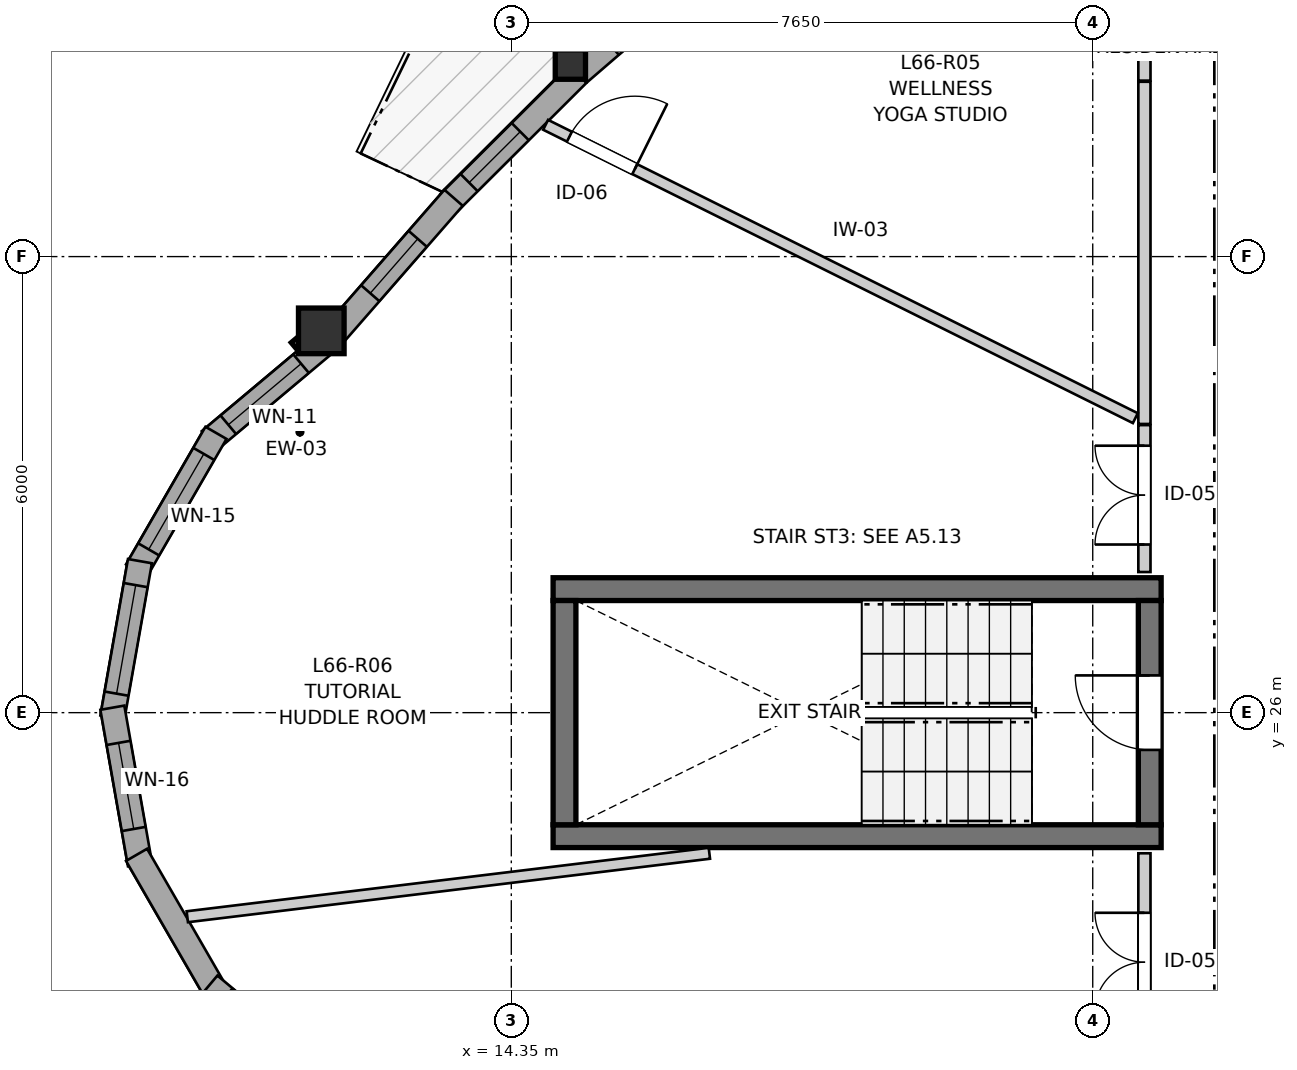
"""IFC4 building model, lengths in metres.
Left out: names, types, materials, properties, quantities, classifications, styles, units other than length and angle.
Written with IfcOpenShell. Run it as: python <this file> out.ifc"""

import sys

from ifc_helpers import new_model, si_unit, direction, frame, frame_2d, origin, origin_2d, place, context, subcontext, project, spatial, rectangle, i_section, extrude, source, transform, mapped, element, fill, save


model = new_model("IFC4")
c1 = context("Model", 3, precision=1e-05, world=origin(), true_north=direction((0.0, 1.0)))
c2 = subcontext(c1, "Body", "Model", "MODEL_VIEW")
j1 = project(units=[si_unit("LENGTHUNIT", "METRE"), si_unit("PLANEANGLEUNIT", "RADIAN")], contexts=[c1])
p1 = place(None, origin())
s1 = spatial("IfcSite", under=j1, at=p1, CompositionType="ELEMENT")
p2 = place(p1, origin())
s2 = spatial("IfcBuilding", under=s1, at=p2, CompositionType="ELEMENT")
p3 = place(p2, frame((0.0, 0.0, 221.2)))
s3 = spatial("IfcBuildingStorey", under=s2, at=p3, CompositionType="ELEMENT", Elevation=221.2)
for number, where, z_axis, x_axis in (
    (1, (14.9, 24.375, 0.0), (0.0, 0.0, 1.0), (1.0, 0.0, 0.0)),
    (2, (22.9, 27.625, 0.0), (0.0, 0.0, 1.0), (-1.0, 0.0, 0.0)),
):
    element("IfcWall", number, at=place(p3, frame(where, z_axis=z_axis, x_axis=x_axis)), inside=s3, PredefinedType="SHEAR", context=c2, shape_type="SweptSolid", body=[
        extrude(rectangle(XDim=8.0, YDim=0.3, at=frame_2d((4.0, 0.0))), origin(), (0.0, 0.0, 1.0), 2.96),
    ])
p4 = place(p3, frame((15.05, 27.475, 0.0), z_axis=(0.0, 0.0, 1.0), x_axis=(0.0, -1.0, 0.0)))
e3 = element("IfcWall", 3, at=p4, inside=s3, PredefinedType="SHEAR", context=c2, shape_type="SweptSolid", body=[
    extrude(rectangle(XDim=2.95, YDim=0.3, at=frame_2d((1.475, 0.0))), origin(), (0.0, 0.0, 1.0), 2.96),
])
p5 = place(p3, frame((22.75, 24.525, 0.0), z_axis=(0.0, 0.0, 1.0), x_axis=(0.0, 1.0, 0.0)))
e4 = element("IfcWall", 4, at=p5, inside=s3, PredefinedType="SHEAR", context=c2, shape_type="SweptSolid", body=[
    extrude(rectangle(XDim=2.95, YDim=0.3, at=frame_2d((1.475, 0.0))), origin(), (0.0, 0.0, 1.0), 2.96),
])
p6 = place(p5, frame((0.985, 0.0, 0.0)))
e5 = element("IfcOpeningElement", 5, at=p6, cuts=e4, PredefinedType="OPENING", context=c2, shape_type="SweptSolid", body=[
    extrude(rectangle(XDim=0.98, YDim=2.15, at=frame_2d((0.49, 1.075))), frame((0.0, 0.16, 0.0), z_axis=(0.0, -1.0, 0.0), x_axis=(1.0, 0.0, 0.0)), (0.0, 0.0, 1.0), 0.32),
])
m1 = source(origin(), c2, "Body", "SweptSolid", [
    extrude(rectangle(XDim=0.6, YDim=0.6, at=origin_2d()), origin(), (0.0, 0.0, 1.0), 2.96),
])
p7 = place(p3, frame((11.85, 31.023, 0.0), z_axis=(0.0, 0.0, 1.0), x_axis=(1.0, 0.0, 0.0)))
e6 = element("IfcColumn", 6, at=p7, inside=s3, PredefinedType="COLUMN", context=c2, shape_type="MappedRepresentation", body=[
    mapped(m1, transform((0.0, 0.0, 0.0), x_axis=(1.0, 0.0, 0.0), y_axis=(0.0, 1.0, 0.0), z_axis=(0.0, 0.0, 1.0), scale=1.0)),
])
m2 = source(origin(), c2, "Body", "SweptSolid", [
    extrude(i_section(OverallWidth=0.398, OverallDepth=0.387, WebThickness=0.019, FlangeThickness=0.03, FilletRadius=0.015, at=origin_2d()), origin(), (0.0, 0.0, 1.0), 2.96),
])
p8 = place(p3, frame((15.127, 34.526, 0.0), z_axis=(0.0, 0.0, 1.0), x_axis=(1.0, 0.0, 0.0)))
e7 = element("IfcColumn", 7, at=p8, inside=s3, PredefinedType="PILASTER", context=c2, shape_type="MappedRepresentation", body=[
    mapped(m2, transform((0.0, 0.0, 0.0), x_axis=(1.0, 0.0, 0.0), y_axis=(0.0, 1.0, 0.0), z_axis=(0.0, 0.0, 1.0), scale=1.0)),
])
p9 = place(p3, frame((11.884, 30.843, 0.0), z_axis=(0.0, 0.0, 1.0), x_axis=(-0.76606505432, -0.642763045414, 0.0)))
e8 = element("IfcWall", 8, at=p9, inside=s3, PredefinedType="SOLIDWALL", context=c2, shape_type="SweptSolid", body=[
    extrude(rectangle(XDim=1.962, YDim=0.32, at=frame_2d((0.981, 0.0))), origin(), (0.0, 0.0, 1.0), 2.58),
])
p10 = place(p9, frame((0.391, 0.0, 0.82)))
e9 = element("IfcOpeningElement", 9, at=p10, cuts=e8, PredefinedType="OPENING", context=c2, shape_type="SweptSolid", body=[
    extrude(rectangle(XDim=1.25, YDim=1.35, at=frame_2d((0.625, 0.675))), frame((0.0, 0.17, 0.0), z_axis=(0.0, -1.0, 0.0), x_axis=(1.0, 0.0, 0.0)), (0.0, 0.0, 1.0), 0.34),
])
p11 = place(p3, frame((10.465, 29.681, 0.0), z_axis=(0.0, 0.0, 1.0), x_axis=(-0.499995423472, -0.866028046028, 0.0)))
e10 = element("IfcWall", 10, at=p11, inside=s3, PredefinedType="SOLIDWALL", context=c2, shape_type="SweptSolid", body=[
    extrude(rectangle(XDim=2.09, YDim=0.32, at=frame_2d((1.045, 0.0))), origin(), (0.0, 0.0, 1.0), 2.58),
])
p12 = place(p11, frame((0.32, 0.0, 0.82)))
e11 = element("IfcOpeningElement", 11, at=p12, cuts=e10, PredefinedType="OPENING", context=c2, shape_type="SweptSolid", body=[
    extrude(rectangle(XDim=1.45, YDim=1.25, at=frame_2d((0.725, 0.625))), frame((0.0, 0.17, 0.0), z_axis=(0.0, -1.0, 0.0), x_axis=(1.0, 0.0, 0.0)), (0.0, 0.0, 1.0), 0.34),
])
p13 = place(p3, frame((9.464, 27.993, 0.0), z_axis=(0.0, 0.0, 1.0), x_axis=(-0.173672066494, -0.984803540469, 0.0)))
e12 = element("IfcWall", 12, at=p13, inside=s3, PredefinedType="SOLIDWALL", context=c2, shape_type="SweptSolid", body=[
    extrude(rectangle(XDim=2.09, YDim=0.32, at=frame_2d((1.045, 0.0))), origin(), (0.0, 0.0, 1.0), 2.58),
])
p14 = place(p13, frame((0.32, 0.0, 0.82)))
e13 = element("IfcOpeningElement", 13, at=p14, cuts=e12, PredefinedType="OPENING", context=c2, shape_type="SweptSolid", body=[
    extrude(rectangle(XDim=1.45, YDim=1.25, at=frame_2d((0.725, 0.625))), frame((0.0, 0.17, 0.0), z_axis=(0.0, -1.0, 0.0), x_axis=(1.0, 0.0, 0.0)), (0.0, 0.0, 1.0), 0.34),
])
p15 = place(p3, frame((9.101, 26.065, 0.0), z_axis=(0.0, 0.0, 1.0), x_axis=(0.173672066494, -0.984803540469, 0.0)))
e14 = element("IfcWall", 14, at=p15, inside=s3, PredefinedType="SOLIDWALL", context=c2, shape_type="SweptSolid", body=[
    extrude(rectangle(XDim=2.09, YDim=0.32, at=frame_2d((1.045, 0.0))), origin(), (0.0, 0.0, 1.0), 2.58),
])
p16 = place(p15, frame((0.47, 0.0, 0.82)))
e15 = element("IfcOpeningElement", 15, at=p16, cuts=e14, PredefinedType="OPENING", context=c2, shape_type="SweptSolid", body=[
    extrude(rectangle(XDim=1.15, YDim=1.2, at=frame_2d((0.575, 0.6))), frame((0.0, 0.17, 0.0), z_axis=(0.0, -1.0, 0.0), x_axis=(1.0, 0.0, 0.0)), (0.0, 0.0, 1.0), 0.34),
])
p17 = place(p3, frame((9.419, 24.129, 0.0), z_axis=(0.0, 0.0, 1.0), x_axis=(0.499995423472, -0.866028046028, 0.0)))
e16 = element("IfcWall", 16, at=p17, inside=s3, PredefinedType="SOLIDWALL", context=c2, shape_type="SweptSolid", body=[
    extrude(rectangle(XDim=2.09, YDim=0.32, at=frame_2d((1.045, 0.0))), origin(), (0.0, 0.0, 1.0), 2.58),
])
p18 = place(p3, frame((10.381, 22.419, 0.0), z_axis=(0.0, 0.0, 1.0), x_axis=(0.766099948115, -0.642721455608, 0.0)))
e17 = element("IfcWall", 17, at=p18, inside=s3, PredefinedType="SOLIDWALL", context=c2, shape_type="SweptSolid", body=[
    extrude(rectangle(XDim=2.032, YDim=0.32, at=frame_2d((1.016, 0.0))), origin(), (0.0, 0.0, 1.0), 2.58),
])
p19 = place(p18, frame((0.261, 0.0, 0.82)))
e18 = element("IfcOpeningElement", 18, at=p19, cuts=e17, PredefinedType="OPENING", context=c2, shape_type="SweptSolid", body=[
    extrude(rectangle(XDim=1.45, YDim=1.25, at=frame_2d((0.725, 0.625))), frame((0.0, 0.17, 0.0), z_axis=(0.0, -1.0, 0.0), x_axis=(1.0, 0.0, 0.0)), (0.0, 0.0, 1.0), 0.34),
])
p20 = place(p3, frame((17.03, 35.955, 0.0), z_axis=(0.0, 0.0, 1.0), x_axis=(-0.757489541562, -0.652847297937, 0.0)))
e19 = element("IfcWall", 19, at=p20, inside=s3, PredefinedType="SOLIDWALL", context=c2, shape_type="SweptSolid", body=[
    extrude(rectangle(XDim=2.354, YDim=0.32, at=frame_2d((1.177, 0.0))), origin(), (0.0, 0.0, 1.0), 2.58),
])
p21 = place(p20, frame((0.407, 0.0, 0.82)))
e20 = element("IfcOpeningElement", 20, at=p21, cuts=e19, PredefinedType="OPENING", context=c2, shape_type="SweptSolid", body=[
    extrude(rectangle(XDim=1.4, YDim=1.35, at=frame_2d((0.7, 0.675))), frame((0.0, 0.17, 0.0), z_axis=(0.0, -1.0, 0.0), x_axis=(1.0, 0.0, 0.0)), (0.0, 0.0, 1.0), 0.34),
])
p22 = place(p3, frame((15.226, 34.399, 0.0), z_axis=(0.0, 0.0, 1.0), x_axis=(-0.708431997636, -0.705779076429, 0.0)))
e21 = element("IfcWall", 21, at=p22, inside=s3, PredefinedType="SOLIDWALL", context=c2, shape_type="SweptSolid", body=[
    extrude(rectangle(XDim=2.393, YDim=0.32, at=frame_2d((1.196, 0.0))), origin(), (0.0, 0.0, 1.0), 2.58),
])
p23 = place(p22, frame((1.07, 0.0, 0.82)))
e22 = element("IfcOpeningElement", 22, at=p23, cuts=e21, PredefinedType="OPENING", context=c2, shape_type="SweptSolid", body=[
    extrude(rectangle(XDim=0.95, YDim=1.35, at=frame_2d((0.475, 0.675))), frame((0.0, 0.17, 0.0), z_axis=(0.0, -1.0, 0.0), x_axis=(1.0, 0.0, 0.0)), (0.0, 0.0, 1.0), 0.34),
])
p24 = place(p3, frame((13.591, 32.774, 0.0), z_axis=(0.0, 0.0, 1.0), x_axis=(-0.657601126926, -0.753366283999, 0.0)))
e23 = element("IfcWall", 23, at=p24, inside=s3, PredefinedType="SOLIDWALL", context=c2, shape_type="SweptSolid", body=[
    extrude(rectangle(XDim=2.374, YDim=0.32, at=frame_2d((1.187, 0.0))), origin(), (0.0, 0.0, 1.0), 2.58),
])
p25 = place(p24, frame((0.717, 0.0, 0.82)))
e24 = element("IfcOpeningElement", 24, at=p25, cuts=e23, PredefinedType="OPENING", context=c2, shape_type="SweptSolid", body=[
    extrude(rectangle(XDim=0.95, YDim=1.35, at=frame_2d((0.475, 0.675))), frame((0.0, 0.17, 0.0), z_axis=(0.0, -1.0, 0.0), x_axis=(1.0, 0.0, 0.0)), (0.0, 0.0, 1.0), 0.34),
])
p26 = place(p3, frame((22.68, 29.798, 0.0), z_axis=(0.0, 0.0, 1.0), x_axis=(0.0, 1.0, 0.0)))
e25 = element("IfcWall", 25, at=p26, inside=s3, PredefinedType="PARTITIONING", context=c2, shape_type="SweptSolid", body=[
    extrude(rectangle(XDim=4.502, YDim=0.16, at=frame_2d((2.251, 0.0))), origin(), (0.0, 0.0, 1.0), 2.96),
])
p27 = place(p3, frame((22.68, 21.241, 0.0), z_axis=(0.0, 0.0, 1.0), x_axis=(0.0, 1.0, 0.0)))
e26 = element("IfcWall", 26, at=p27, inside=s3, PredefinedType="PARTITIONING", context=c2, shape_type="SweptSolid", body=[
    extrude(rectangle(XDim=2.909, YDim=0.16, at=frame_2d((1.455, 0.0))), origin(), (0.0, 0.0, 1.0), 2.96),
])
p28 = place(p27, frame((0.826, 0.0, 0.0)))
e27 = element("IfcOpeningElement", 27, at=p28, cuts=e26, PredefinedType="OPENING", context=c2, shape_type="SweptSolid", body=[
    extrude(rectangle(XDim=1.3, YDim=2.1, at=frame_2d((0.65, 1.05))), frame((0.0, 0.09, 0.0), z_axis=(0.0, -1.0, 0.0), x_axis=(1.0, 0.0, 0.0)), (0.0, 0.0, 1.0), 0.18),
])
p29 = place(p3, frame((22.68, 27.85, 0.0), z_axis=(0.0, 0.0, 1.0), x_axis=(0.0, 1.0, 0.0)))
e28 = element("IfcWall", 28, at=p29, inside=s3, PredefinedType="PARTITIONING", context=c2, shape_type="SweptSolid", body=[
    extrude(rectangle(XDim=1.933, YDim=0.16, at=frame_2d((0.966, 0.0))), origin(), (0.0, 0.0, 1.0), 2.96),
])
p30 = place(p29, frame((0.362, 0.0, 0.0)))
e29 = element("IfcOpeningElement", 29, at=p30, cuts=e28, PredefinedType="OPENING", context=c2, shape_type="SweptSolid", body=[
    extrude(rectangle(XDim=1.3, YDim=2.1, at=frame_2d((0.65, 1.05))), frame((0.0, 0.09, 0.0), z_axis=(0.0, -1.0, 0.0), x_axis=(1.0, 0.0, 0.0)), (0.0, 0.0, 1.0), 0.18),
])
p31 = place(p3, frame((14.802, 33.734, 0.0), z_axis=(0.0, 0.0, 1.0), x_axis=(0.895354955696, -0.445353234311, 0.0)))
e30 = element("IfcWall", 30, at=p31, inside=s3, PredefinedType="PARTITIONING", context=c2, shape_type="SweptSolid", body=[
    extrude(rectangle(XDim=8.666, YDim=0.145, at=frame_2d((4.333, 0.0))), origin(), (0.0, 0.0, 1.0), 2.96),
])
p32 = place(p31, frame((0.35, 0.0, 0.0)))
e31 = element("IfcOpeningElement", 31, at=p32, cuts=e30, PredefinedType="OPENING", context=c2, shape_type="SweptSolid", body=[
    extrude(rectangle(XDim=0.96, YDim=2.1, at=frame_2d((0.48, 1.05))), frame((0.0, 0.083, 0.0), z_axis=(0.0, -1.0, 0.0), x_axis=(1.0, 0.0, 0.0)), (0.0, 0.0, 1.0), 0.165),
])
p33 = place(p3, frame((10.087, 23.315, 0.0), z_axis=(0.0, 0.0, 1.0), x_axis=(0.992692853732, 0.120668546642, 0.0)))
e32 = element("IfcWall", 32, at=p33, inside=s3, PredefinedType="PARTITIONING", context=c2, shape_type="SweptSolid", body=[
    extrude(rectangle(XDim=6.919, YDim=0.145, at=frame_2d((3.46, 0.0))), origin(), (0.0, 0.0, 1.0), 2.96),
])
p34 = place(p3, frame((22.68, 34.315, 0.0), z_axis=(0.0, 0.0, 1.0), x_axis=(0.0, 1.0, 0.0)))
e33 = element("IfcWall", 33, at=p34, inside=s3, PredefinedType="PARTITIONING", context=c2, shape_type="SweptSolid", body=[
    extrude(rectangle(XDim=0.707, YDim=0.16, at=frame_2d((0.353, 0.0))), origin(), (0.0, 0.0, 1.0), 2.96),
])
m3 = source(origin(), c2, "Body", "SweptSolid", [
    extrude(rectangle(XDim=1.25, YDim=1.35, at=frame_2d((0.625, 0.675))), frame((0.0, 0.03, 0.0), z_axis=(0.0, -1.0, 0.0), x_axis=(1.0, 0.0, 0.0)), (0.0, 0.0, 1.0), 0.06),
])
p35 = place(p10, origin())
e34 = element("IfcWindow", 34, at=p35, inside=s3, PartitioningType="SINGLE_PANEL", PredefinedType="WINDOW", context=c2, shape_type="MappedRepresentation", body=[
    mapped(m3, transform((0.0, 0.0, 0.0), x_axis=(1.0, 0.0, 0.0), y_axis=(0.0, 1.0, 0.0), z_axis=(0.0, 0.0, 1.0), scale=1.0)),
])
fill(e9, e34)
m4 = source(origin(), c2, "Body", "SweptSolid", [
    extrude(rectangle(XDim=1.45, YDim=1.25, at=frame_2d((0.725, 0.625))), frame((0.0, 0.03, 0.0), z_axis=(0.0, -1.0, 0.0), x_axis=(1.0, 0.0, 0.0)), (0.0, 0.0, 1.0), 0.06),
])
p36 = place(p12, origin())
e35 = element("IfcWindow", 35, at=p36, inside=s3, PartitioningType="SINGLE_PANEL", PredefinedType="WINDOW", context=c2, shape_type="MappedRepresentation", body=[
    mapped(m4, transform((0.0, 0.0, 0.0), x_axis=(1.0, 0.0, 0.0), y_axis=(0.0, 1.0, 0.0), z_axis=(0.0, 0.0, 1.0), scale=1.0)),
])
fill(e11, e35)
p37 = place(p14, origin())
e36 = element("IfcWindow", 36, at=p37, inside=s3, PartitioningType="SINGLE_PANEL", PredefinedType="WINDOW", context=c2, shape_type="MappedRepresentation", body=[
    mapped(m4, transform((0.0, 0.0, 0.0), x_axis=(1.0, 0.0, 0.0), y_axis=(0.0, 1.0, 0.0), z_axis=(0.0, 0.0, 1.0), scale=1.0)),
])
fill(e13, e36)
m5 = source(origin(), c2, "Body", "SweptSolid", [
    extrude(rectangle(XDim=1.15, YDim=1.2, at=frame_2d((0.575, 0.6))), frame((0.0, 0.03, 0.0), z_axis=(0.0, -1.0, 0.0), x_axis=(1.0, 0.0, 0.0)), (0.0, 0.0, 1.0), 0.06),
])
p38 = place(p16, origin())
e37 = element("IfcWindow", 37, at=p38, inside=s3, PartitioningType="SINGLE_PANEL", PredefinedType="WINDOW", context=c2, shape_type="MappedRepresentation", body=[
    mapped(m5, transform((0.0, 0.0, 0.0), x_axis=(1.0, 0.0, 0.0), y_axis=(0.0, 1.0, 0.0), z_axis=(0.0, 0.0, 1.0), scale=1.0)),
])
fill(e15, e37)
m6 = source(origin(), c2, "Body", "SweptSolid", [
    extrude(rectangle(XDim=0.95, YDim=1.35, at=frame_2d((0.475, 0.675))), frame((0.0, 0.03, 0.0), z_axis=(0.0, -1.0, 0.0), x_axis=(1.0, 0.0, 0.0)), (0.0, 0.0, 1.0), 0.06),
])
p39 = place(p23, origin())
e38 = element("IfcWindow", 38, at=p39, inside=s3, PartitioningType="SINGLE_PANEL", PredefinedType="WINDOW", context=c2, shape_type="MappedRepresentation", body=[
    mapped(m6, transform((0.0, 0.0, 0.0), x_axis=(1.0, 0.0, 0.0), y_axis=(0.0, 1.0, 0.0), z_axis=(0.0, 0.0, 1.0), scale=1.0)),
])
fill(e22, e38)
p40 = place(p25, origin())
e39 = element("IfcWindow", 39, at=p40, inside=s3, PartitioningType="SINGLE_PANEL", PredefinedType="WINDOW", context=c2, shape_type="MappedRepresentation", body=[
    mapped(m6, transform((0.0, 0.0, 0.0), x_axis=(1.0, 0.0, 0.0), y_axis=(0.0, 1.0, 0.0), z_axis=(0.0, 0.0, 1.0), scale=1.0)),
])
fill(e24, e39)
m7 = source(origin(), c2, "Body", "SweptSolid", [
    extrude(rectangle(XDim=0.98, YDim=2.15, at=frame_2d((0.49, 1.075))), frame((0.0, 0.025, 0.0), z_axis=(0.0, -1.0, 0.0), x_axis=(1.0, 0.0, 0.0)), (0.0, 0.0, 1.0), 0.05),
])
p41 = place(p6, origin())
e40 = element("IfcDoor", 40, at=p41, inside=s3, OperationType="SINGLE_SWING_RIGHT", PredefinedType="DOOR", context=c2, shape_type="MappedRepresentation", body=[
    mapped(m7, transform((0.0, 0.0, 0.0), x_axis=(1.0, 0.0, 0.0), y_axis=(0.0, 1.0, 0.0), z_axis=(0.0, 0.0, 1.0), scale=1.0)),
])
fill(e5, e40)
m8 = source(origin(), c2, "Body", "SweptSolid", [
    extrude(rectangle(XDim=0.96, YDim=2.1, at=frame_2d((0.48, 1.05))), frame((0.0, 0.025, 0.0), z_axis=(0.0, -1.0, 0.0), x_axis=(1.0, 0.0, 0.0)), (0.0, 0.0, 1.0), 0.05),
])
p42 = place(p32, origin())
e41 = element("IfcDoor", 41, at=p42, inside=s3, OperationType="SINGLE_SWING_RIGHT", PredefinedType="DOOR", context=c2, shape_type="MappedRepresentation", body=[
    mapped(m8, transform((0.0, 0.0, 0.0), x_axis=(1.0, 0.0, 0.0), y_axis=(0.0, 1.0, 0.0), z_axis=(0.0, 0.0, 1.0), scale=1.0)),
])
fill(e31, e41)
m9 = source(origin(), c2, "Body", "SweptSolid", [
    extrude(rectangle(XDim=1.3, YDim=2.1, at=frame_2d((0.65, 1.05))), frame((0.0, 0.025, 0.0), z_axis=(0.0, -1.0, 0.0), x_axis=(1.0, 0.0, 0.0)), (0.0, 0.0, 1.0), 0.05),
])
p43 = place(p28, origin())
e42 = element("IfcDoor", 42, at=p43, inside=s3, OperationType="DOUBLE_DOOR_SINGLE_SWING", PredefinedType="DOOR", context=c2, shape_type="MappedRepresentation", body=[
    mapped(m9, transform((0.0, 0.0, 0.0), x_axis=(1.0, 0.0, 0.0), y_axis=(0.0, 1.0, 0.0), z_axis=(0.0, 0.0, 1.0), scale=1.0)),
])
fill(e27, e42)
p44 = place(p30, origin())
e43 = element("IfcDoor", 43, at=p44, inside=s3, OperationType="DOUBLE_DOOR_SINGLE_SWING", PredefinedType="DOOR", context=c2, shape_type="MappedRepresentation", body=[
    mapped(m9, transform((0.0, 0.0, 0.0), x_axis=(1.0, 0.0, 0.0), y_axis=(0.0, 1.0, 0.0), z_axis=(0.0, 0.0, 1.0), scale=1.0)),
])
fill(e29, e43)
save(model, sys.argv[1])
